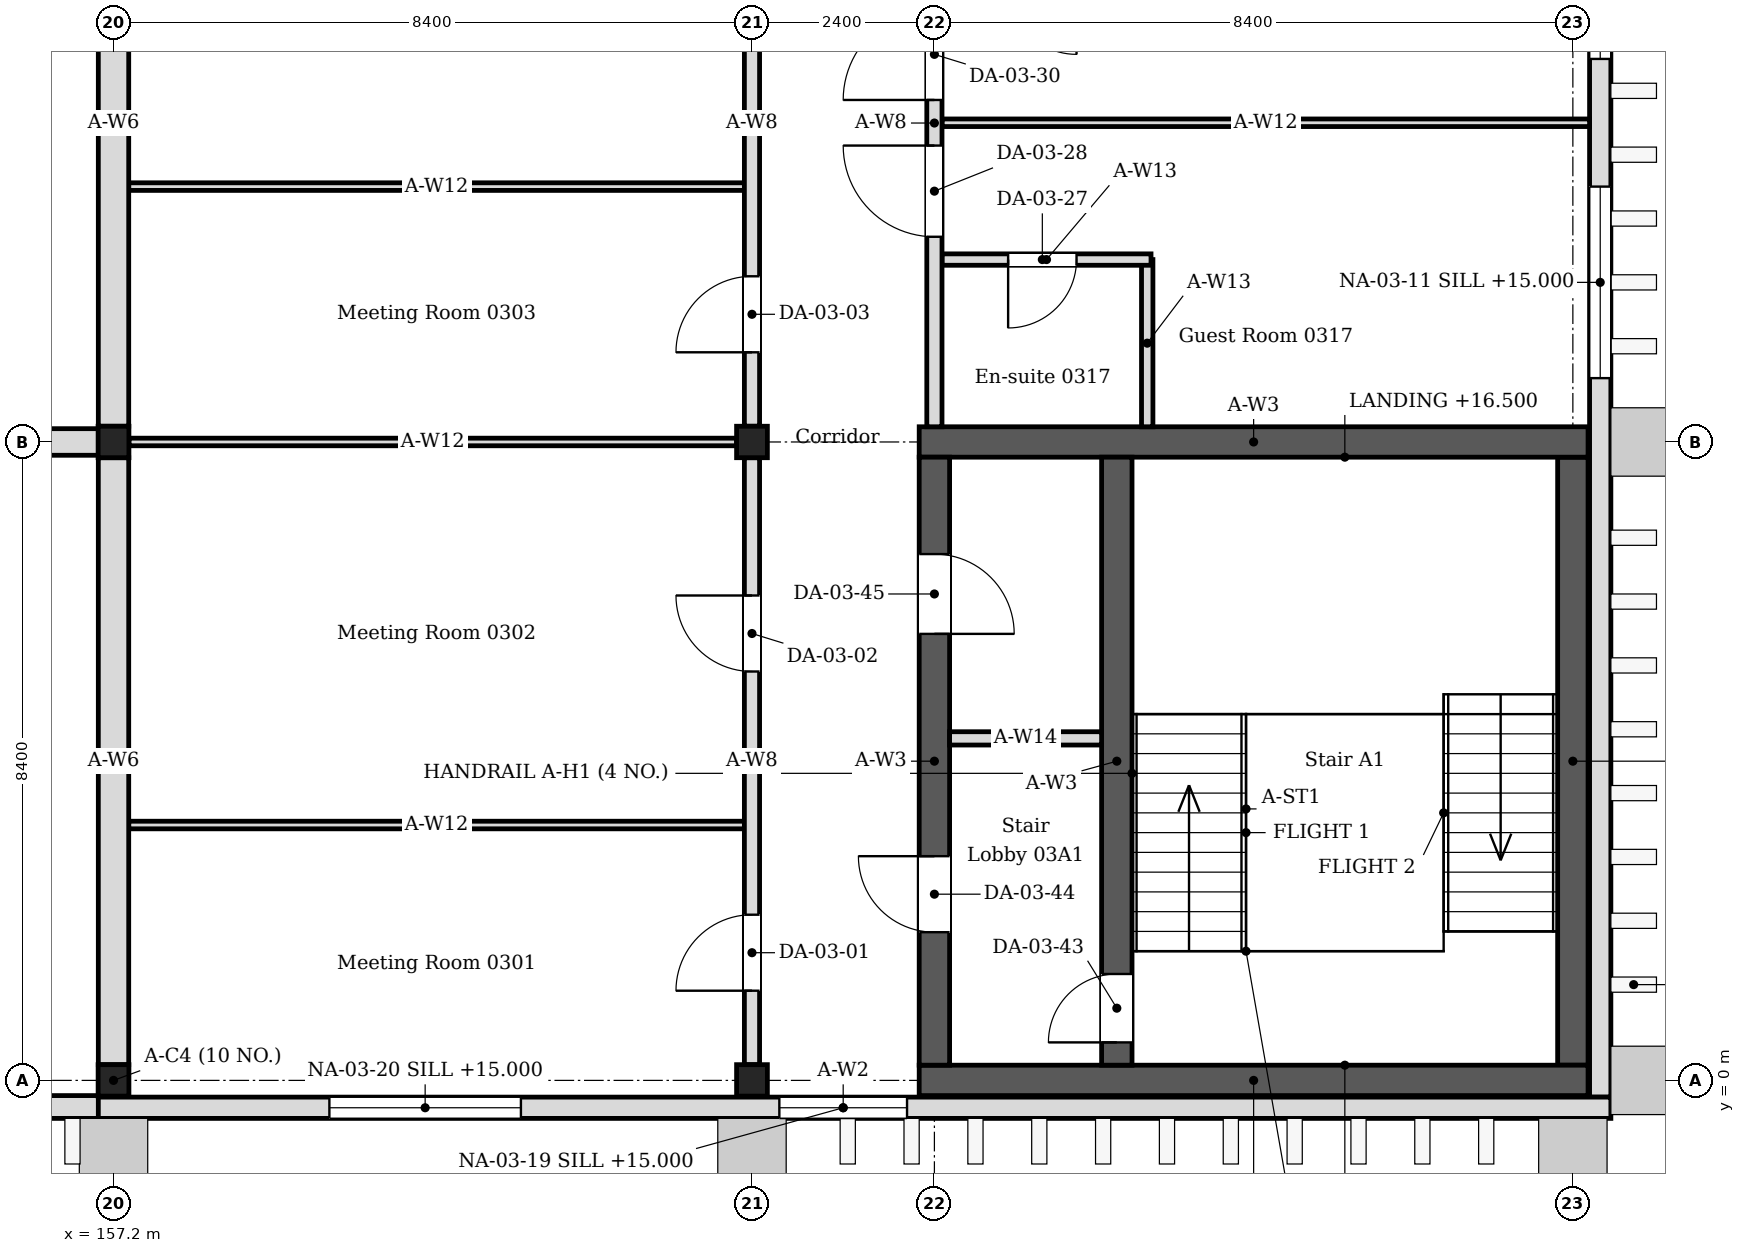
"""IFC4 building model, lengths in metres.
Left out: names, types, materials, properties, quantities, classifications, styles, units other than length and angle.
Written with IfcOpenShell. Run it as: python <this file> out.ifc"""

import sys

from ifc_helpers import new_model, si_unit, direction, frame, frame_2d, origin, origin_2d, place, context, subcontext, project, spatial, rectangle, i_section, extrude, element, fill, save


model = new_model("IFC4")
c1 = context("Model", 3, precision=1e-05, world=origin(), true_north=direction((0.0, 1.0)))
c2 = subcontext(c1, "Body", "Model", "MODEL_VIEW")
j1 = project(units=[si_unit("LENGTHUNIT", "METRE"), si_unit("PLANEANGLEUNIT", "RADIAN")], contexts=[c1])
p1 = place(None, origin())
s1 = spatial("IfcSite", under=j1, at=p1, CompositionType="ELEMENT")
p2 = place(p1, origin())
s2 = spatial("IfcBuilding", under=s1, at=p2, CompositionType="ELEMENT")
p3 = place(p2, frame((0.0, 0.0, 14.4)))
s3 = spatial("IfcBuildingStorey", under=s2, at=p3, CompositionType="ELEMENT", Elevation=14.4)
for number, where, z_axis, x_axis in (
    (1, (157.2, 0.0, 0.0), (0.0, 0.0, 1.0), (1.0, 0.0, 0.0)),
    (2, (157.2, 8.4, 0.0), (0.0, 0.0, 1.0), (1.0, 0.0, 0.0)),
    (3, (165.6, 0.0, 0.0), (0.0, 0.0, 1.0), (1.0, 0.0, 0.0)),
    (4, (165.6, 8.4, 0.0), (0.0, 0.0, 1.0), (1.0, 0.0, 0.0)),
):
    element("IfcColumn", number, at=place(p3, frame(where, z_axis=z_axis, x_axis=x_axis)), inside=s3, PredefinedType="COLUMN", context=c2, shape_type="SweptSolid", body=[
        extrude(i_section(OverallWidth=0.405, OverallDepth=0.414, WebThickness=0.018, FlangeThickness=0.028, FilletRadius=0.022, at=origin_2d()), origin(), (0.0, 0.0, 1.0), 4.2),
    ])
for number, where, z_axis, x_axis in (
    (5, (167.8, 0.0, 0.0), (0.0, 0.0, 1.0), (1.0, 0.0, 0.0)),
    (6, (167.8, 8.4, 0.0), (0.0, 0.0, 1.0), (1.0, 0.0, 0.0)),
):
    element("IfcWall", number, at=place(p3, frame(where, z_axis=z_axis, x_axis=x_axis)), inside=s3, PredefinedType="SOLIDWALL", context=c2, shape_type="SweptSolid", body=[
        extrude(rectangle(XDim=8.8, YDim=0.4, at=frame_2d((4.4, 0.0))), origin(), (0.0, 0.0, 1.0), 4.05),
    ])
p4 = place(p3, frame((168.0, 0.2, 0.0), z_axis=(0.0, 0.0, 1.0), x_axis=(0.0, 1.0, 0.0)))
e7 = element("IfcWall", 7, at=p4, inside=s3, PredefinedType="SOLIDWALL", context=c2, shape_type="SweptSolid", body=[
    extrude(rectangle(XDim=8.0, YDim=0.4, at=frame_2d((4.0, 0.0))), origin(), (0.0, 0.0, 1.0), 4.05),
])
p5 = place(p4, frame((1.75, 0.0, 0.0)))
e8 = element("IfcOpeningElement", 8, at=p5, cuts=e7, PredefinedType="OPENING", context=c2, shape_type="SweptSolid", body=[
    extrude(rectangle(XDim=1.0, YDim=2.1, at=frame_2d((0.5, 1.05))), frame((0.0, 0.21, 0.0), z_axis=(0.0, -1.0, 0.0), x_axis=(1.0, 0.0, 0.0)), (0.0, 0.0, 1.0), 0.42),
])
p6 = place(p4, frame((5.675, 0.0, 0.0)))
e9 = element("IfcOpeningElement", 9, at=p6, cuts=e7, PredefinedType="OPENING", context=c2, shape_type="SweptSolid", body=[
    extrude(rectangle(XDim=1.05, YDim=2.1, at=frame_2d((0.525, 1.05))), frame((0.0, 0.21, 0.0), z_axis=(0.0, -1.0, 0.0), x_axis=(1.0, 0.0, 0.0)), (0.0, 0.0, 1.0), 0.42),
])
p7 = place(p3, frame((176.4, 0.2, 0.0), z_axis=(0.0, 0.0, 1.0), x_axis=(0.0, 1.0, 0.0)))
e10 = element("IfcWall", 10, at=p7, inside=s3, PredefinedType="SOLIDWALL", context=c2, shape_type="SweptSolid", body=[
    extrude(rectangle(XDim=8.0, YDim=0.4, at=frame_2d((4.0, 0.0))), origin(), (0.0, 0.0, 1.0), 4.05),
])
p8 = place(p3, frame((176.76, -0.22, 0.0), z_axis=(0.0, 0.0, 1.0), x_axis=(0.0, 1.0, 0.0)))
e11 = element("IfcWall", 11, at=p8, inside=s3, PredefinedType="SOLIDWALL", context=c2, shape_type="SweptSolid", body=[
    extrude(rectangle(XDim=42.57, YDim=0.28, at=frame_2d((21.285, 0.0))), origin(), (0.0, 0.0, 1.0), 4.05),
])
p9 = place(p8, frame((9.46, 0.0, 0.6)))
e12 = element("IfcOpeningElement", 12, at=p9, cuts=e11, PredefinedType="OPENING", context=c2, shape_type="SweptSolid", body=[
    extrude(rectangle(XDim=2.52, YDim=2.4, at=frame_2d((1.26, 1.2))), frame((0.0, 0.15, 0.0), z_axis=(0.0, -1.0, 0.0), x_axis=(1.0, 0.0, 0.0)), (0.0, 0.0, 1.0), 0.3),
])
p10 = place(p8, frame((13.66, 0.0, 0.6)))
e13 = element("IfcOpeningElement", 13, at=p10, cuts=e11, PredefinedType="OPENING", context=c2, shape_type="SweptSolid", body=[
    extrude(rectangle(XDim=2.52, YDim=2.4, at=frame_2d((1.26, 1.2))), frame((0.0, 0.15, 0.0), z_axis=(0.0, -1.0, 0.0), x_axis=(1.0, 0.0, 0.0)), (0.0, 0.0, 1.0), 0.3),
])
p11 = place(p8, frame((17.44, 0.0, 0.6)))
e14 = element("IfcOpeningElement", 14, at=p11, cuts=e11, PredefinedType="OPENING", context=c2, shape_type="SweptSolid", body=[
    extrude(rectangle(XDim=2.52, YDim=2.4, at=frame_2d((1.26, 1.2))), frame((0.0, 0.15, 0.0), z_axis=(0.0, -1.0, 0.0), x_axis=(1.0, 0.0, 0.0)), (0.0, 0.0, 1.0), 0.3),
])
p12 = place(p8, frame((21.64, 0.0, 0.6)))
e15 = element("IfcOpeningElement", 15, at=p12, cuts=e11, PredefinedType="OPENING", context=c2, shape_type="SweptSolid", body=[
    extrude(rectangle(XDim=2.52, YDim=2.4, at=frame_2d((1.26, 1.2))), frame((0.0, 0.15, 0.0), z_axis=(0.0, -1.0, 0.0), x_axis=(1.0, 0.0, 0.0)), (0.0, 0.0, 1.0), 0.3),
])
p13 = place(p3, frame((156.7, -0.36, 0.0), z_axis=(0.0, 0.0, 1.0), x_axis=(1.0, 0.0, 0.0)))
e16 = element("IfcWall", 16, at=p13, inside=s3, PredefinedType="SOLIDWALL", context=c2, shape_type="SweptSolid", body=[
    extrude(rectangle(XDim=20.2, YDim=0.28, at=frame_2d((10.1, 0.0))), origin(), (0.0, 0.0, 1.0), 4.05),
])
p14 = place(p13, frame((9.26, 0.0, 0.6)))
e17 = element("IfcOpeningElement", 17, at=p14, cuts=e16, PredefinedType="OPENING", context=c2, shape_type="SweptSolid", body=[
    extrude(rectangle(XDim=1.68, YDim=2.4, at=frame_2d((0.84, 1.2))), frame((0.0, 0.15, 0.0), z_axis=(0.0, -1.0, 0.0), x_axis=(1.0, 0.0, 0.0)), (0.0, 0.0, 1.0), 0.3),
])
p15 = place(p13, frame((3.34, 0.0, 0.6)))
e18 = element("IfcOpeningElement", 18, at=p15, cuts=e16, PredefinedType="OPENING", context=c2, shape_type="SweptSolid", body=[
    extrude(rectangle(XDim=2.52, YDim=2.4, at=frame_2d((1.26, 1.2))), frame((0.0, 0.15, 0.0), z_axis=(0.0, -1.0, 0.0), x_axis=(1.0, 0.0, 0.0)), (0.0, 0.0, 1.0), 0.3),
])
p16 = place(p3, frame((150.8, -0.35, 0.0), z_axis=(0.0, 0.0, 1.0), x_axis=(1.0, 0.0, 0.0)))
e19 = element("IfcWall", 19, at=p16, inside=s3, PredefinedType="SOLIDWALL", context=c2, shape_type="SweptSolid", body=[
    extrude(rectangle(XDim=6.2, YDim=0.3, at=frame_2d((3.1, 0.0))), origin(), (0.0, 0.0, 1.0), 3.95),
])
p17 = place(p16, frame((0.64, 0.0, 0.3)))
e20 = element("IfcOpeningElement", 20, at=p17, cuts=e19, PredefinedType="OPENING", context=c2, shape_type="SweptSolid", body=[
    extrude(rectangle(XDim=1.2, YDim=3.3, at=frame_2d((0.6, 1.65))), frame((0.0, 0.16, 0.0), z_axis=(0.0, -1.0, 0.0), x_axis=(1.0, 0.0, 0.0)), (0.0, 0.0, 1.0), 0.32),
])
p18 = place(p16, frame((2.32, 0.0, 0.3)))
e21 = element("IfcOpeningElement", 21, at=p18, cuts=e19, PredefinedType="OPENING", context=c2, shape_type="SweptSolid", body=[
    extrude(rectangle(XDim=1.2, YDim=3.3, at=frame_2d((0.6, 1.65))), frame((0.0, 0.16, 0.0), z_axis=(0.0, -1.0, 0.0), x_axis=(1.0, 0.0, 0.0)), (0.0, 0.0, 1.0), 0.32),
])
p19 = place(p16, frame((4.0, 0.0, 0.3)))
e22 = element("IfcOpeningElement", 22, at=p19, cuts=e19, PredefinedType="OPENING", context=c2, shape_type="SweptSolid", body=[
    extrude(rectangle(XDim=1.2, YDim=3.3, at=frame_2d((0.6, 1.65))), frame((0.0, 0.16, 0.0), z_axis=(0.0, -1.0, 0.0), x_axis=(1.0, 0.0, 0.0)), (0.0, 0.0, 1.0), 0.32),
])
p20 = place(p3, frame((170.8, 8.6, 0.0), z_axis=(0.0, 0.0, 1.0), x_axis=(0.0, 1.0, 0.0)))
e23 = element("IfcWall", 23, at=p20, inside=s3, PredefinedType="PARTITIONING", context=c2, shape_type="SweptSolid", body=[
    extrude(rectangle(XDim=2.2, YDim=0.15, at=frame_2d((1.1, 0.0))), origin(), (0.0, 0.0, 1.0), 4.05),
])
p21 = place(p3, frame((170.85, 10.8, 0.0), z_axis=(0.0, 0.0, 1.0), x_axis=(-1.0, 0.0, 0.0)))
e24 = element("IfcWall", 24, at=p21, inside=s3, PredefinedType="PARTITIONING", context=c2, shape_type="SweptSolid", body=[
    extrude(rectangle(XDim=2.75, YDim=0.15, at=frame_2d((1.375, 0.0))), origin(), (0.0, 0.0, 1.0), 4.05),
])
p22 = place(p21, frame((0.98, 0.0, 0.0)))
e25 = element("IfcOpeningElement", 25, at=p22, cuts=e24, PredefinedType="OPENING", context=c2, shape_type="SweptSolid", body=[
    extrude(rectangle(XDim=0.9, YDim=2.1, at=frame_2d((0.45, 1.05))), frame((0.0, 0.085, 0.0), z_axis=(0.0, -1.0, 0.0), x_axis=(1.0, 0.0, 0.0)), (0.0, 0.0, 1.0), 0.17),
])
p23 = place(p3, frame((157.403, 8.4, 0.0), z_axis=(0.0, 0.0, 1.0), x_axis=(1.0, 0.0, 0.0)))
e26 = element("IfcWall", 26, at=p23, inside=s3, PredefinedType="PARTITIONING", context=c2, shape_type="SweptSolid", body=[
    extrude(rectangle(XDim=7.995, YDim=0.1, at=frame_2d((3.998, 0.0))), origin(), (0.0, 0.0, 1.0), 3.604),
])
for number, where, z_axis, x_axis in (
    (27, (157.4, 3.36, 0.0), (0.0, 0.0, 1.0), (1.0, 0.0, 0.0)),
    (28, (157.4, 11.76, 0.0), (0.0, 0.0, 1.0), (1.0, 0.0, 0.0)),
):
    element("IfcWall", number, at=place(p3, frame(where, z_axis=z_axis, x_axis=x_axis)), inside=s3, PredefinedType="PARTITIONING", context=c2, shape_type="SweptSolid", body=[
        extrude(rectangle(XDim=8.1, YDim=0.1, at=frame_2d((4.05, 0.0))), origin(), (0.0, 0.0, 1.0), 3.604),
    ])
p24 = place(p3, frame((168.1, 12.6, 0.0), z_axis=(0.0, 0.0, 1.0), x_axis=(1.0, 0.0, 0.0)))
e29 = element("IfcWall", 29, at=p24, inside=s3, PredefinedType="PARTITIONING", context=c2, shape_type="SweptSolid", body=[
    extrude(rectangle(XDim=8.52, YDim=0.1, at=frame_2d((4.26, 0.0))), origin(), (0.0, 0.0, 1.0), 3.604),
])
for number, where, z_axis, x_axis in (
    (30, (157.2, 0.207, 0.0), (0.0, 0.0, 1.0), (0.0, 1.0, 0.0)),
    (31, (157.2, 8.607, 0.0), (0.0, 0.0, 1.0), (0.0, 1.0, 0.0)),
):
    element("IfcWall", number, at=place(p3, frame(where, z_axis=z_axis, x_axis=x_axis)), inside=s3, PredefinedType="SOLIDWALL", context=c2, shape_type="SweptSolid", body=[
        extrude(rectangle(XDim=7.986, YDim=0.4, at=frame_2d((3.993, 0.0))), origin(), (0.0, 0.0, 1.0), 3.45),
    ])
p25 = place(p3, frame((165.6, 0.207, 0.0), z_axis=(0.0, 0.0, 1.0), x_axis=(0.0, 1.0, 0.0)))
e32 = element("IfcWall", 32, at=p25, inside=s3, PredefinedType="PARTITIONING", context=c2, shape_type="SweptSolid", body=[
    extrude(rectangle(XDim=7.986, YDim=0.2, at=frame_2d((3.993, 0.0))), origin(), (0.0, 0.0, 1.0), 3.45),
])
p26 = place(p25, frame((0.973, 0.0, 0.0)))
e33 = element("IfcOpeningElement", 33, at=p26, cuts=e32, PredefinedType="OPENING", context=c2, shape_type="SweptSolid", body=[
    extrude(rectangle(XDim=1.0, YDim=2.1, at=frame_2d((0.5, 1.05))), frame((0.0, 0.11, 0.0), z_axis=(0.0, -1.0, 0.0), x_axis=(1.0, 0.0, 0.0)), (0.0, 0.0, 1.0), 0.22),
])
p27 = place(p25, frame((5.173, 0.0, 0.0)))
e34 = element("IfcOpeningElement", 34, at=p27, cuts=e32, PredefinedType="OPENING", context=c2, shape_type="SweptSolid", body=[
    extrude(rectangle(XDim=1.0, YDim=2.1, at=frame_2d((0.5, 1.05))), frame((0.0, 0.11, 0.0), z_axis=(0.0, -1.0, 0.0), x_axis=(1.0, 0.0, 0.0)), (0.0, 0.0, 1.0), 0.22),
])
p28 = place(p3, frame((165.6, 8.607, 0.0), z_axis=(0.0, 0.0, 1.0), x_axis=(0.0, 1.0, 0.0)))
e35 = element("IfcWall", 35, at=p28, inside=s3, PredefinedType="PARTITIONING", context=c2, shape_type="SweptSolid", body=[
    extrude(rectangle(XDim=7.986, YDim=0.2, at=frame_2d((3.993, 0.0))), origin(), (0.0, 0.0, 1.0), 3.45),
])
p29 = place(p28, frame((0.973, 0.0, 0.0)))
e36 = element("IfcOpeningElement", 36, at=p29, cuts=e35, PredefinedType="OPENING", context=c2, shape_type="SweptSolid", body=[
    extrude(rectangle(XDim=1.0, YDim=2.1, at=frame_2d((0.5, 1.05))), frame((0.0, 0.11, 0.0), z_axis=(0.0, -1.0, 0.0), x_axis=(1.0, 0.0, 0.0)), (0.0, 0.0, 1.0), 0.22),
])
p30 = place(p28, frame((5.173, 0.0, 0.0)))
e37 = element("IfcOpeningElement", 37, at=p30, cuts=e35, PredefinedType="OPENING", context=c2, shape_type="SweptSolid", body=[
    extrude(rectangle(XDim=1.0, YDim=2.1, at=frame_2d((0.5, 1.05))), frame((0.0, 0.11, 0.0), z_axis=(0.0, -1.0, 0.0), x_axis=(1.0, 0.0, 0.0)), (0.0, 0.0, 1.0), 0.22),
])
p31 = place(p3, frame((168.0, 8.6, 0.0), z_axis=(0.0, 0.0, 1.0), x_axis=(0.0, 1.0, 0.0)))
e38 = element("IfcWall", 38, at=p31, inside=s3, PredefinedType="PARTITIONING", context=c2, shape_type="SweptSolid", body=[
    extrude(rectangle(XDim=7.993, YDim=0.2, at=frame_2d((3.997, 0.0))), origin(), (0.0, 0.0, 1.0), 3.45),
])
p32 = place(p31, frame((2.5, 0.0, 0.0)))
e39 = element("IfcOpeningElement", 39, at=p32, cuts=e38, PredefinedType="OPENING", context=c2, shape_type="SweptSolid", body=[
    extrude(rectangle(XDim=1.2, YDim=2.1, at=frame_2d((0.6, 1.05))), frame((0.0, 0.11, 0.0), z_axis=(0.0, -1.0, 0.0), x_axis=(1.0, 0.0, 0.0)), (0.0, 0.0, 1.0), 0.22),
])
p33 = place(p31, frame((4.3, 0.0, 0.0)))
e40 = element("IfcOpeningElement", 40, at=p33, cuts=e38, PredefinedType="OPENING", context=c2, shape_type="SweptSolid", body=[
    extrude(rectangle(XDim=1.2, YDim=2.1, at=frame_2d((0.6, 1.05))), frame((0.0, 0.11, 0.0), z_axis=(0.0, -1.0, 0.0), x_axis=(1.0, 0.0, 0.0)), (0.0, 0.0, 1.0), 0.22),
])
p34 = place(p3, frame((170.4, 0.2, 0.0), z_axis=(0.0, 0.0, 1.0), x_axis=(0.0, 1.0, 0.0)))
e41 = element("IfcWall", 41, at=p34, inside=s3, PredefinedType="SOLIDWALL", context=c2, shape_type="SweptSolid", body=[
    extrude(rectangle(XDim=8.0, YDim=0.4, at=frame_2d((4.0, 0.0))), origin(), (0.0, 0.0, 1.0), 4.05),
])
p35 = place(p34, frame((0.3, 0.0, 0.0)))
e42 = element("IfcOpeningElement", 42, at=p35, cuts=e41, PredefinedType="OPENING", context=c2, shape_type="SweptSolid", body=[
    extrude(rectangle(XDim=0.9, YDim=2.1, at=frame_2d((0.45, 1.05))), frame((0.0, 0.21, 0.0), z_axis=(0.0, -1.0, 0.0), x_axis=(1.0, 0.0, 0.0)), (0.0, 0.0, 1.0), 0.42),
])
p36 = place(p3, frame((168.2, 4.5, 0.0), z_axis=(0.0, 0.0, 1.0), x_axis=(1.0, 0.0, 0.0)))
e43 = element("IfcWall", 43, at=p36, inside=s3, PredefinedType="PARTITIONING", context=c2, shape_type="SweptSolid", body=[
    extrude(rectangle(XDim=2.0, YDim=0.175, at=frame_2d((1.0, 0.0))), origin(), (0.0, 0.0, 1.0), 4.05),
])
p37 = place(p3, frame((151.325, 8.4, 0.0), z_axis=(0.0, 0.0, 1.0), x_axis=(1.0, 0.0, 0.0)))
e44 = element("IfcWall", 44, at=p37, inside=s3, PredefinedType="PARTITIONING", context=c2, shape_type="SweptSolid", body=[
    extrude(rectangle(XDim=5.875, YDim=0.35, at=frame_2d((2.938, 0.0))), origin(), (0.0, 0.0, 1.0), 3.25),
])
p38 = place(p37, frame((3.525, 0.0, 0.0)))
e45 = element("IfcOpeningElement", 45, at=p38, cuts=e44, PredefinedType="OPENING", context=c2, shape_type="SweptSolid", body=[
    extrude(rectangle(XDim=1.1, YDim=2.4, at=frame_2d((0.55, 1.2))), frame((0.0, 0.185, 0.0), z_axis=(0.0, -1.0, 0.0), x_axis=(1.0, 0.0, 0.0)), (0.0, 0.0, 1.0), 0.37),
])
p39 = place(p9, origin())
e46 = element("IfcWindow", 46, at=p39, inside=s3, PartitioningType="SINGLE_PANEL", PredefinedType="WINDOW", context=c2, shape_type="SweptSolid", body=[
    extrude(rectangle(XDim=2.52, YDim=2.4, at=frame_2d((1.26, 1.2))), frame((0.0, 0.03, 0.0), z_axis=(0.0, -1.0, 0.0), x_axis=(1.0, 0.0, 0.0)), (0.0, 0.0, 1.0), 0.06),
])
fill(e12, e46)
p40 = place(p10, origin())
e47 = element("IfcWindow", 47, at=p40, inside=s3, PartitioningType="SINGLE_PANEL", PredefinedType="WINDOW", context=c2, shape_type="SweptSolid", body=[
    extrude(rectangle(XDim=2.52, YDim=2.4, at=frame_2d((1.26, 1.2))), frame((0.0, 0.03, 0.0), z_axis=(0.0, -1.0, 0.0), x_axis=(1.0, 0.0, 0.0)), (0.0, 0.0, 1.0), 0.06),
])
fill(e13, e47)
p41 = place(p14, origin())
e48 = element("IfcWindow", 48, at=p41, inside=s3, PartitioningType="SINGLE_PANEL", PredefinedType="WINDOW", context=c2, shape_type="SweptSolid", body=[
    extrude(rectangle(XDim=1.68, YDim=2.4, at=frame_2d((0.84, 1.2))), frame((0.0, 0.03, 0.0), z_axis=(0.0, -1.0, 0.0), x_axis=(1.0, 0.0, 0.0)), (0.0, 0.0, 1.0), 0.06),
])
fill(e17, e48)
p42 = place(p15, origin())
e49 = element("IfcWindow", 49, at=p42, inside=s3, PartitioningType="SINGLE_PANEL", PredefinedType="WINDOW", context=c2, shape_type="SweptSolid", body=[
    extrude(rectangle(XDim=2.52, YDim=2.4, at=frame_2d((1.26, 1.2))), frame((0.0, 0.03, 0.0), z_axis=(0.0, -1.0, 0.0), x_axis=(1.0, 0.0, 0.0)), (0.0, 0.0, 1.0), 0.06),
])
fill(e18, e49)
p43 = place(p26, origin())
e50 = element("IfcDoor", 50, at=p43, inside=s3, OperationType="SINGLE_SWING_LEFT", PredefinedType="DOOR", context=c2, shape_type="SweptSolid", body=[
    extrude(rectangle(XDim=1.0, YDim=2.1, at=frame_2d((0.5, 1.05))), frame((0.0, 0.025, 0.0), z_axis=(0.0, -1.0, 0.0), x_axis=(1.0, 0.0, 0.0)), (0.0, 0.0, 1.0), 0.05),
])
fill(e33, e50)
p44 = place(p27, origin())
e51 = element("IfcDoor", 51, at=p44, inside=s3, OperationType="SINGLE_SWING_RIGHT", PredefinedType="DOOR", context=c2, shape_type="SweptSolid", body=[
    extrude(rectangle(XDim=1.0, YDim=2.1, at=frame_2d((0.5, 1.05))), frame((0.0, 0.025, 0.0), z_axis=(0.0, -1.0, 0.0), x_axis=(1.0, 0.0, 0.0)), (0.0, 0.0, 1.0), 0.05),
])
fill(e34, e51)
p45 = place(p29, origin())
e52 = element("IfcDoor", 52, at=p45, inside=s3, OperationType="SINGLE_SWING_LEFT", PredefinedType="DOOR", context=c2, shape_type="SweptSolid", body=[
    extrude(rectangle(XDim=1.0, YDim=2.1, at=frame_2d((0.5, 1.05))), frame((0.0, 0.025, 0.0), z_axis=(0.0, -1.0, 0.0), x_axis=(1.0, 0.0, 0.0)), (0.0, 0.0, 1.0), 0.05),
])
fill(e36, e52)
p46 = place(p22, origin())
e53 = element("IfcDoor", 53, at=p46, inside=s3, OperationType="SINGLE_SWING_RIGHT", PredefinedType="DOOR", context=c2, shape_type="SweptSolid", body=[
    extrude(rectangle(XDim=0.9, YDim=2.1, at=frame_2d((0.45, 1.05))), frame((0.0, 0.025, 0.0), z_axis=(0.0, -1.0, 0.0), x_axis=(1.0, 0.0, 0.0)), (0.0, 0.0, 1.0), 0.05),
])
fill(e25, e53)
p47 = place(p32, origin())
e54 = element("IfcDoor", 54, at=p47, inside=s3, OperationType="SINGLE_SWING_RIGHT", PredefinedType="DOOR", context=c2, shape_type="SweptSolid", body=[
    extrude(rectangle(XDim=1.2, YDim=2.1, at=frame_2d((0.6, 1.05))), frame((0.0, 0.025, 0.0), z_axis=(0.0, -1.0, 0.0), x_axis=(1.0, 0.0, 0.0)), (0.0, 0.0, 1.0), 0.05),
])
fill(e39, e54)
p48 = place(p33, origin())
e55 = element("IfcDoor", 55, at=p48, inside=s3, OperationType="SINGLE_SWING_LEFT", PredefinedType="DOOR", context=c2, shape_type="SweptSolid", body=[
    extrude(rectangle(XDim=1.2, YDim=2.1, at=frame_2d((0.6, 1.05))), frame((0.0, 0.025, 0.0), z_axis=(0.0, -1.0, 0.0), x_axis=(1.0, 0.0, 0.0)), (0.0, 0.0, 1.0), 0.05),
])
fill(e40, e55)
p49 = place(p35, origin())
e56 = element("IfcDoor", 56, at=p49, inside=s3, OperationType="SINGLE_SWING_LEFT", PredefinedType="DOOR", context=c2, shape_type="SweptSolid", body=[
    extrude(rectangle(XDim=0.9, YDim=2.1, at=frame_2d((0.45, 1.05))), frame((0.0, 0.025, 0.0), z_axis=(0.0, -1.0, 0.0), x_axis=(1.0, 0.0, 0.0)), (0.0, 0.0, 1.0), 0.05),
])
fill(e42, e56)
p50 = place(p5, origin())
e57 = element("IfcDoor", 57, at=p50, inside=s3, OperationType="SINGLE_SWING_RIGHT", PredefinedType="DOOR", context=c2, shape_type="SweptSolid", body=[
    extrude(rectangle(XDim=1.0, YDim=2.1, at=frame_2d((0.5, 1.05))), frame((0.0, 0.025, 0.0), z_axis=(0.0, -1.0, 0.0), x_axis=(1.0, 0.0, 0.0)), (0.0, 0.0, 1.0), 0.05),
])
fill(e8, e57)
p51 = place(p6, origin())
e58 = element("IfcDoor", 58, at=p51, inside=s3, OperationType="SINGLE_SWING_LEFT", PredefinedType="DOOR", context=c2, shape_type="SweptSolid", body=[
    extrude(rectangle(XDim=1.05, YDim=2.1, at=frame_2d((0.525, 1.05))), frame((0.0, 0.025, 0.0), z_axis=(0.0, -1.0, 0.0), x_axis=(1.0, 0.0, 0.0)), (0.0, 0.0, 1.0), 0.05),
])
fill(e9, e58)
save(model, sys.argv[1])
